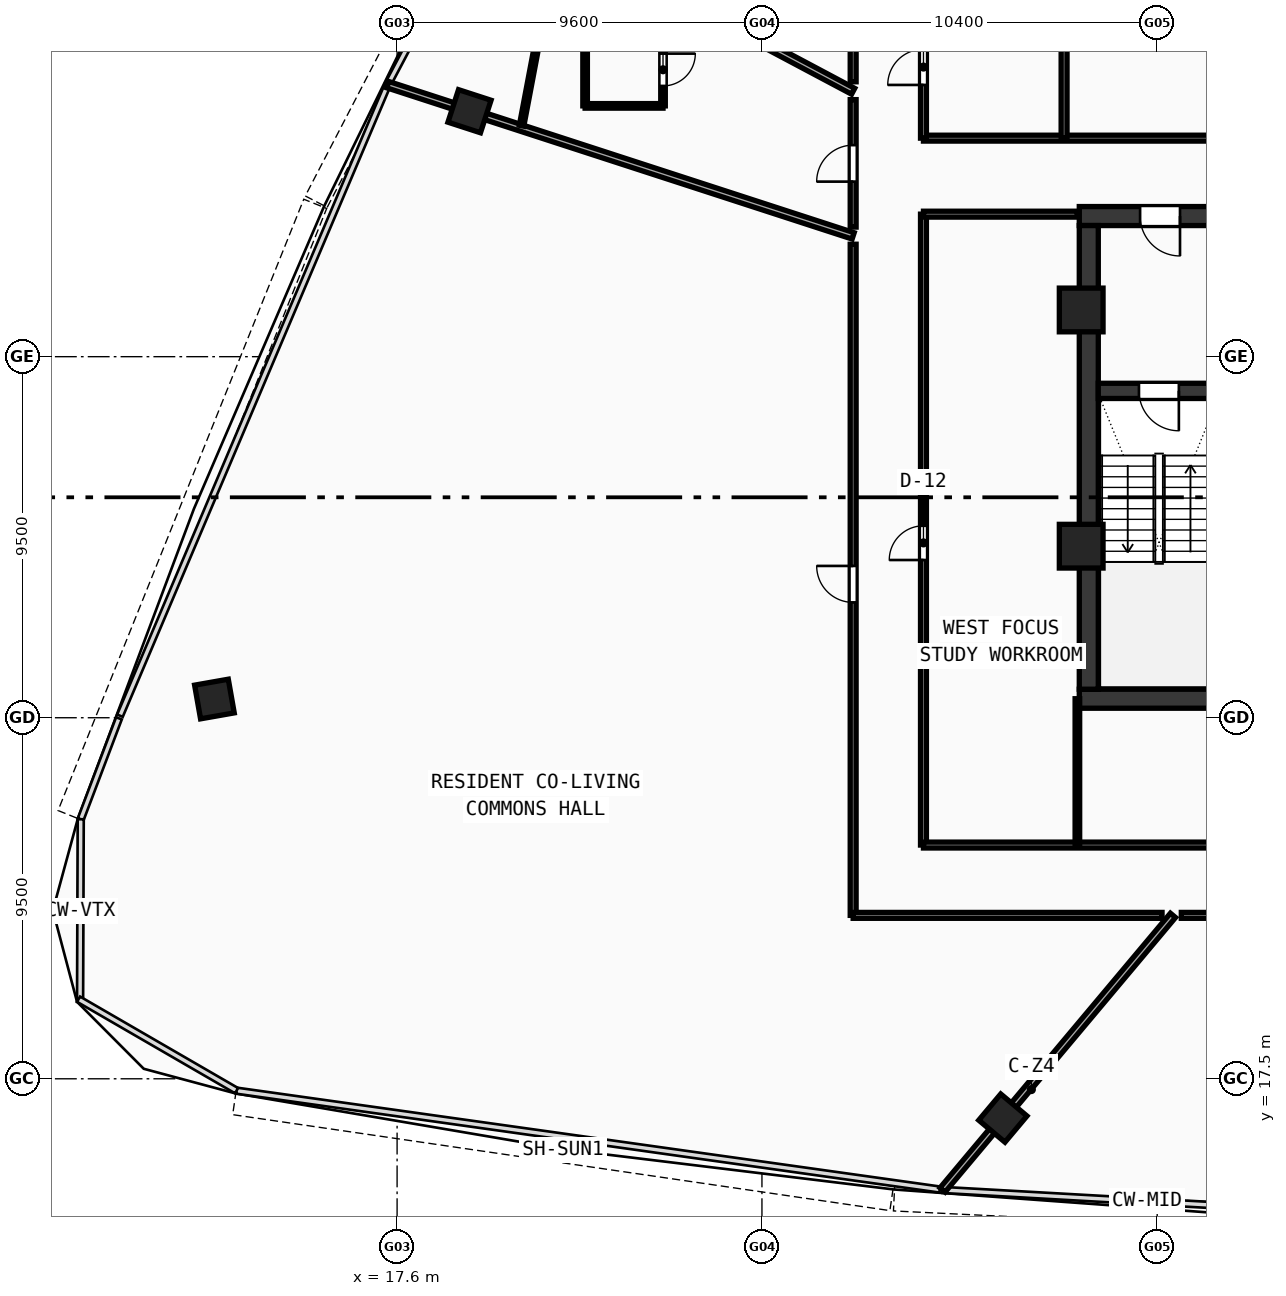
"""IFC4 building model, lengths in metres.
Left out: names, types, materials, properties, quantities, classifications, styles, units other than length and angle.
Written with IfcOpenShell. Run it as: python <this file> out.ifc"""

import sys

from ifc_helpers import new_model, si_unit, direction, frame, frame_2d, origin, origin_with_axes, origin_2d, place, context, subcontext, project, spatial, rectangle, hollow_rectangle, extrude, source, transform, mapped, element, fill, save


model = new_model("IFC4")
c1 = context("Model", 3, precision=1e-05, world=origin(), true_north=direction((0.0, 1.0)))
c2 = subcontext(c1, "Body", "Model", "MODEL_VIEW")
j1 = project(units=[si_unit("LENGTHUNIT", "METRE"), si_unit("PLANEANGLEUNIT", "RADIAN")], contexts=[c1])
p1 = place(None, origin())
s1 = spatial("IfcSite", under=j1, at=p1, CompositionType="ELEMENT")
p2 = place(p1, origin())
s2 = spatial("IfcBuilding", under=s1, at=p2, CompositionType="ELEMENT")
p3 = place(p2, frame((0.0, 0.0, 188.56)))
s3 = spatial("IfcBuildingStorey", under=s2, at=p3, CompositionType="ELEMENT", Elevation=188.56)
p4 = place(p3, frame((35.55, 27.5, 0.0), z_axis=(0.0, 0.0, 1.0), x_axis=(1.0, 0.0, 0.0)))
e1 = element("IfcWall", 1, at=p4, inside=s3, PredefinedType="SHEAR", context=c2, shape_type="SweptSolid", body=[
    extrude(rectangle(XDim=24.9, YDim=0.5, at=frame_2d((12.45, 0.0))), origin(), (0.0, 0.0, 1.0), 3.54),
])
p5 = place(p3, frame((35.55, 40.2, 0.0), z_axis=(0.0, 0.0, 1.0), x_axis=(1.0, 0.0, 0.0)))
e2 = element("IfcWall", 2, at=p5, inside=s3, PredefinedType="SHEAR", context=c2, shape_type="SweptSolid", body=[
    extrude(rectangle(XDim=11.25, YDim=0.5, at=frame_2d((5.625, 0.0))), origin(), (0.0, 0.0, 1.0), 3.54),
])
p6 = place(p5, frame((1.6, 0.0, 0.0)))
e3 = element("IfcOpeningElement", 3, at=p6, cuts=e2, PredefinedType="OPENING", context=c2, shape_type="SweptSolid", body=[
    extrude(rectangle(XDim=1.05, YDim=2.1, at=frame_2d((0.525, 1.05))), frame((0.0, 0.26, 0.0), z_axis=(0.0, -1.0, 0.0), x_axis=(1.0, 0.0, 0.0)), (0.0, 0.0, 1.0), 0.52),
])
p7 = place(p3, frame((35.8, 27.75, 0.0), z_axis=(0.0, 0.0, 1.0), x_axis=(0.0, 1.0, 0.0)))
e4 = element("IfcWall", 4, at=p7, inside=s3, PredefinedType="SHEAR", context=c2, shape_type="SweptSolid", body=[
    extrude(rectangle(XDim=12.2, YDim=0.5, at=frame_2d((6.1, 0.0))), origin(), (0.0, 0.0, 1.0), 3.54),
])
p8 = place(p3, frame((36.05, 35.6, 0.0), z_axis=(0.0, 0.0, 1.0), x_axis=(1.0, 0.0, 0.0)))
e5 = element("IfcWall", 5, at=p8, inside=s3, PredefinedType="SHEAR", context=c2, shape_type="SweptSolid", body=[
    extrude(rectangle(XDim=3.15, YDim=0.4, at=frame_2d((1.575, 0.0))), origin(), (0.0, 0.0, 1.0), 3.54),
])
p9 = place(p8, frame((1.07, 0.0, 0.0)))
e6 = element("IfcOpeningElement", 6, at=p9, cuts=e5, PredefinedType="OPENING", context=c2, shape_type="SweptSolid", body=[
    extrude(rectangle(XDim=1.05, YDim=2.1, at=frame_2d((0.525, 1.05))), frame((0.0, 0.21, 0.0), z_axis=(0.0, -1.0, 0.0), x_axis=(1.0, 0.0, 0.0)), (0.0, 0.0, 1.0), 0.42),
])
m1 = source(origin(), c2, "Body", "SweptSolid", [
    extrude(hollow_rectangle(XDim=1.15, YDim=1.15, WallThickness=0.048, at=origin_2d()), origin(), (0.0, 0.0, 1.0), 3.8),
])
for number, where, z_axis, x_axis in (
    (7, (35.6, 37.729, -0.26), (0.0, 0.0, 1.0), (1.0, 0.0, 0.0)),
    (8, (35.6, 31.513, -0.26), (0.0, 0.0, 1.0), (1.0, 0.0, 0.0)),
):
    element("IfcColumn", number, at=place(p3, frame(where, z_axis=z_axis, x_axis=x_axis)), inside=s3, PredefinedType="COLUMN", context=c2, shape_type="MappedRepresentation", body=[
        mapped(m1, transform((0.0, 0.0, 0.0), scale=1.0)),
    ])
m2 = source(origin(), c2, "Body", "SweptSolid", [
    extrude(hollow_rectangle(XDim=0.9, YDim=0.9, WallThickness=0.036, at=origin_2d()), origin(), (0.0, 0.0, 1.0), 3.8),
])
for number, where, z_axis, x_axis in (
    (9, (33.539, 16.466, -0.26), (0.0, 0.0, 1.0), (0.766, -0.643, 0.0)),
    (10, (19.505, 42.958, -0.26), (0.0, 0.0, 1.0), (-0.309, -0.951, 0.0)),
    (11, (12.793, 27.492, -0.26), (0.0, 0.0, 1.0), (0.174, -0.985, 0.0)),
):
    element("IfcColumn", number, at=place(p3, frame(where, z_axis=z_axis, x_axis=x_axis)), inside=s3, PredefinedType="COLUMN", context=c2, shape_type="MappedRepresentation", body=[
        mapped(m2, transform((0.0, 0.0, 0.0), scale=1.0)),
    ])
p10 = place(p3, frame((31.45, 42.25, 0.0), z_axis=(0.0, 0.0, 1.0), x_axis=(1.0, 0.0, 0.0)))
e12 = element("IfcWall", 12, at=p10, inside=s3, PredefinedType="PARTITIONING", context=c2, shape_type="SweptSolid", body=[
    extrude(rectangle(XDim=33.1, YDim=0.155, at=frame_2d((16.55, 0.0))), origin(), (0.0, 0.0, 1.0), 2.89),
])
p11 = place(p3, frame((31.45, 42.25, 0.0), z_axis=(0.0, 0.0, 1.0), x_axis=(0.0, 1.0, 0.0)))
e13 = element("IfcWall", 13, at=p11, inside=s3, PredefinedType="PARTITIONING", context=c2, shape_type="SweptSolid", body=[
    extrude(rectangle(XDim=11.7, YDim=0.155, at=frame_2d((5.85, 0.0))), origin(), (0.0, 0.0, 1.0), 2.89),
])
p12 = place(p11, frame((1.4, 0.0, 0.0)))
e14 = element("IfcOpeningElement", 14, at=p12, cuts=e13, PredefinedType="OPENING", context=c2, shape_type="SweptSolid", body=[
    extrude(rectangle(XDim=0.94, YDim=2.1, at=frame_2d((0.47, 1.05))), frame((0.0, 0.087, 0.0), z_axis=(0.0, -1.0, 0.0), x_axis=(1.0, 0.0, 0.0)), (0.0, 0.0, 1.0), 0.175),
])
p13 = place(p11, frame((6.8, 0.0, 0.0)))
e15 = element("IfcOpeningElement", 15, at=p13, cuts=e13, PredefinedType="OPENING", context=c2, shape_type="SweptSolid", body=[
    extrude(rectangle(XDim=0.92, YDim=2.1, at=frame_2d((0.46, 1.05))), frame((0.0, 0.087, 0.0), z_axis=(0.0, -1.0, 0.0), x_axis=(1.0, 0.0, 0.0)), (0.0, 0.0, 1.0), 0.175),
])
p14 = place(p3, frame((35.15, 42.25, 0.0), z_axis=(0.0, 0.0, 1.0), x_axis=(0.0, 1.0, 0.0)))
e16 = element("IfcWall", 16, at=p14, inside=s3, PredefinedType="PARTITIONING", context=c2, shape_type="SweptSolid", body=[
    extrude(rectangle(XDim=11.7, YDim=0.155, at=frame_2d((5.85, 0.0))), origin(), (0.0, 0.0, 1.0), 2.89),
])
p15 = place(p3, frame((31.45, 23.65, 0.0), z_axis=(0.0, 0.0, 1.0), x_axis=(0.0, 1.0, 0.0)))
e17 = element("IfcWall", 17, at=p15, inside=s3, PredefinedType="PARTITIONING", context=c2, shape_type="SweptSolid", body=[
    extrude(rectangle(XDim=16.6, YDim=0.155, at=frame_2d((8.3, 0.0))), origin(), (0.0, 0.0, 1.0), 2.89),
])
p16 = place(p15, frame((7.5, 0.0, 0.0)))
e18 = element("IfcOpeningElement", 18, at=p16, cuts=e17, PredefinedType="OPENING", context=c2, shape_type="SweptSolid", body=[
    extrude(rectangle(XDim=0.9, YDim=2.08, at=frame_2d((0.45, 1.04))), frame((0.0, 0.087, 0.0), z_axis=(0.0, -1.0, 0.0), x_axis=(1.0, 0.0, 0.0)), (0.0, 0.0, 1.0), 0.175),
])
p17 = place(p3, frame((31.45, 23.65, 0.0), z_axis=(0.0, 0.0, 1.0), x_axis=(1.0, 0.0, 0.0)))
e19 = element("IfcWall", 19, at=p17, inside=s3, PredefinedType="PARTITIONING", context=c2, shape_type="SweptSolid", body=[
    extrude(rectangle(XDim=33.1, YDim=0.155, at=frame_2d((16.55, 0.0))), origin(), (0.0, 0.0, 1.0), 2.89),
])
p18 = place(p17, frame((16.0, 0.0, 0.0)))
e20 = element("IfcOpeningElement", 20, at=p18, cuts=e19, PredefinedType="OPENING", context=c2, shape_type="SweptSolid", body=[
    extrude(rectangle(XDim=0.92, YDim=2.1, at=frame_2d((0.46, 1.05))), frame((0.0, 0.087, 0.0), z_axis=(0.0, -1.0, 0.0), x_axis=(1.0, 0.0, 0.0)), (0.0, 0.0, 1.0), 0.175),
])
p19 = place(p3, frame((31.45, 40.25, 0.0), z_axis=(0.0, 0.0, 1.0), x_axis=(1.0, 0.0, 0.0)))
e21 = element("IfcWall", 21, at=p19, inside=s3, PredefinedType="PARTITIONING", context=c2, shape_type="SweptSolid", body=[
    extrude(rectangle(XDim=4.05, YDim=0.155, at=frame_2d((2.025, 0.0))), origin(), (0.0, 0.0, 1.0), 3.54),
])
p20 = place(p3, frame((35.5, 23.65, 0.0), z_axis=(0.0, 0.0, 1.0), x_axis=(0.0, 1.0, 0.0)))
e22 = element("IfcWall", 22, at=p20, inside=s3, PredefinedType="PARTITIONING", context=c2, shape_type="SweptSolid", body=[
    extrude(rectangle(XDim=3.85, YDim=0.12, at=frame_2d((1.925, 0.0))), origin(), (0.0, 0.0, 1.0), 3.14),
])
p21 = place(p3, frame((29.6, 43.483, 0.0), z_axis=(0.0, 0.0, 1.0), x_axis=(-0.882940086537, 0.469485679853, 0.0)))
e23 = element("IfcWall", 23, at=p21, inside=s3, PredefinedType="PARTITIONING", context=c2, shape_type="SweptSolid", body=[
    extrude(rectangle(XDim=10.91, YDim=0.175, at=frame_2d((5.455, 0.0))), origin(), (0.0, 0.0, 1.0), 2.89),
])
p22 = place(p3, frame((29.6, 39.678, 0.0), z_axis=(0.0, 0.0, 1.0), x_axis=(-0.951054689993, 0.309022615097, 0.0)))
e24 = element("IfcWall", 24, at=p22, inside=s3, PredefinedType="PARTITIONING", context=c2, shape_type="SweptSolid", body=[
    extrude(rectangle(XDim=12.875, YDim=0.175, at=frame_2d((6.438, 0.0))), origin(), (0.0, 0.0, 1.0), 2.89),
])
p23 = place(p3, frame((38.015, 21.8, 0.0), z_axis=(0.0, 0.0, 1.0), x_axis=(-0.642777943688, -0.766052553751, 0.0)))
e25 = element("IfcWall", 25, at=p23, inside=s3, PredefinedType="PARTITIONING", context=c2, shape_type="SweptSolid", body=[
    extrude(rectangle(XDim=9.431, YDim=0.175, at=frame_2d((4.715, 0.0))), origin(), (0.0, 0.0, 1.0), 2.89),
])
p24 = place(p3, frame((29.6, 21.8, 0.0), z_axis=(0.0, 0.0, 1.0), x_axis=(0.0, 1.0, 0.0)))
e26 = element("IfcWall", 26, at=p24, inside=s3, PredefinedType="PARTITIONING", context=c2, shape_type="SweptSolid", body=[
    extrude(rectangle(XDim=17.659, YDim=0.155, at=frame_2d((8.829, 0.0))), origin(), (0.0, 0.0, 1.0), 2.89),
])
p25 = place(p24, frame((8.234, 0.0, 0.0)))
e27 = element("IfcOpeningElement", 27, at=p25, cuts=e26, PredefinedType="OPENING", context=c2, shape_type="SweptSolid", body=[
    extrude(rectangle(XDim=0.96, YDim=2.12, at=frame_2d((0.48, 1.06))), frame((0.0, 0.087, 0.0), z_axis=(0.0, -1.0, 0.0), x_axis=(1.0, 0.0, 0.0)), (0.0, 0.0, 1.0), 0.175),
])
p26 = place(p3, frame((29.6, 39.91, 0.0), z_axis=(0.0, 0.0, 1.0), x_axis=(0.0, 1.0, 0.0)))
e28 = element("IfcWall", 28, at=p26, inside=s3, PredefinedType="PARTITIONING", context=c2, shape_type="SweptSolid", body=[
    extrude(rectangle(XDim=3.354, YDim=0.155, at=frame_2d((1.677, 0.0))), origin(), (0.0, 0.0, 1.0), 3.54),
])
p27 = place(p26, frame((1.196, 0.0, 0.0)))
e29 = element("IfcOpeningElement", 29, at=p27, cuts=e28, PredefinedType="OPENING", context=c2, shape_type="SweptSolid", body=[
    extrude(rectangle(XDim=0.96, YDim=2.12, at=frame_2d((0.48, 1.06))), frame((0.0, 0.087, 0.0), z_axis=(0.0, -1.0, 0.0), x_axis=(1.0, 0.0, 0.0)), (0.0, 0.0, 1.0), 0.175),
])
p28 = place(p3, frame((29.6, 43.733, 0.0), z_axis=(0.0, 0.0, 1.0), x_axis=(0.0, 1.0, 0.0)))
e30 = element("IfcWall", 30, at=p28, inside=s3, PredefinedType="PARTITIONING", context=c2, shape_type="SweptSolid", body=[
    extrude(rectangle(XDim=6.315, YDim=0.155, at=frame_2d((3.157, 0.0))), origin(), (0.0, 0.0, 1.0), 2.89),
])
p29 = place(p28, frame((2.668, 0.0, 0.0)))
e31 = element("IfcOpeningElement", 31, at=p29, cuts=e30, PredefinedType="OPENING", context=c2, shape_type="SweptSolid", body=[
    extrude(rectangle(XDim=0.96, YDim=2.12, at=frame_2d((0.48, 1.06))), frame((0.0, 0.087, 0.0), z_axis=(0.0, -1.0, 0.0), x_axis=(1.0, 0.0, 0.0)), (0.0, 0.0, 1.0), 0.175),
])
p30 = place(p3, frame((44.583, 21.8, 0.0), z_axis=(0.0, 0.0, 1.0), x_axis=(-1.0, 0.0, 0.0)))
e32 = element("IfcWall", 32, at=p30, inside=s3, PredefinedType="PARTITIONING", context=c2, shape_type="SweptSolid", body=[
    extrude(rectangle(XDim=6.349, YDim=0.155, at=frame_2d((3.174, 0.0))), origin(), (0.0, 0.0, 1.0), 2.89),
])
p31 = place(p30, frame((2.696, 0.0, 0.0)))
e33 = element("IfcOpeningElement", 33, at=p31, cuts=e32, PredefinedType="OPENING", context=c2, shape_type="SweptSolid", body=[
    extrude(rectangle(XDim=0.96, YDim=2.12, at=frame_2d((0.48, 1.06))), frame((0.0, 0.087, 0.0), z_axis=(0.0, -1.0, 0.0), x_axis=(1.0, 0.0, 0.0)), (0.0, 0.0, 1.0), 0.175),
])
p32 = place(p3, frame((37.728, 21.8, 0.0), z_axis=(0.0, 0.0, 1.0), x_axis=(-1.0, 0.0, 0.0)))
e34 = element("IfcWall", 34, at=p32, inside=s3, PredefinedType="PARTITIONING", context=c2, shape_type="SweptSolid", body=[
    extrude(rectangle(XDim=8.127, YDim=0.155, at=frame_2d((4.064, 0.0))), origin(), (0.0, 0.0, 1.0), 3.14),
])
p33 = place(p3, frame((22.547, 43.099, 0.0), z_axis=(0.0, 0.0, 1.0), x_axis=(1.0, 0.0, 0.0)))
e35 = element("IfcWall", 35, at=p33, inside=s3, PredefinedType="PARTITIONING", context=c2, shape_type="SweptSolid", body=[
    extrude(rectangle(XDim=2.05, YDim=0.12, at=frame_2d((1.025, 0.0))), origin(), (0.0, 0.0, 1.0), 3.54),
])
p34 = place(p3, frame((24.597, 43.099, 0.0), z_axis=(0.0, 0.0, 1.0), x_axis=(0.0, 1.0, 0.0)))
e36 = element("IfcWall", 36, at=p34, inside=s3, PredefinedType="PARTITIONING", context=c2, shape_type="SweptSolid", body=[
    extrude(rectangle(XDim=1.9, YDim=0.12, at=frame_2d((0.95, 0.0))), origin(), (0.0, 0.0, 1.0), 3.54),
])
p35 = place(p34, frame((0.525, 0.0, 0.0)))
e37 = element("IfcOpeningElement", 37, at=p35, cuts=e36, PredefinedType="OPENING", context=c2, shape_type="SweptSolid", body=[
    extrude(rectangle(XDim=0.85, YDim=2.1, at=frame_2d((0.425, 1.05))), frame((0.0, 0.07, 0.0), z_axis=(0.0, -1.0, 0.0), x_axis=(1.0, 0.0, 0.0)), (0.0, 0.0, 1.0), 0.14),
])
p36 = place(p3, frame((22.547, 44.999, 0.0), z_axis=(0.0, 0.0, 1.0), x_axis=(0.0, -1.0, 0.0)))
e38 = element("IfcWall", 38, at=p36, inside=s3, PredefinedType="PARTITIONING", context=c2, shape_type="SweptSolid", body=[
    extrude(rectangle(XDim=1.9, YDim=0.12, at=frame_2d((0.95, 0.0))), origin(), (0.0, 0.0, 1.0), 3.54),
])
p37 = place(p3, frame((21.818, 47.553, 0.0), z_axis=(0.0, 0.0, 1.0), x_axis=(-0.186234987185, -0.982505231308, 0.0)))
e39 = element("IfcWall", 39, at=p37, inside=s3, PredefinedType="PARTITIONING", context=c2, shape_type="SweptSolid", body=[
    extrude(rectangle(XDim=5.065, YDim=0.12, at=frame_2d((2.533, 0.0))), origin(), (0.0, 0.0, 1.0), 2.89),
])
p38 = place(p37, frame((2.073, 0.0, 0.0)))
e40 = element("IfcOpeningElement", 40, at=p38, cuts=e39, PredefinedType="OPENING", context=c2, shape_type="SweptSolid", body=[
    extrude(rectangle(XDim=0.92, YDim=2.1, at=frame_2d((0.46, 1.05))), frame((0.0, 0.07, 0.0), z_axis=(0.0, -1.0, 0.0), x_axis=(1.0, 0.0, 0.0)), (0.0, 0.0, 1.0), 0.14),
])
m3 = source(origin(), c2, "Body", "SweptSolid", [
    extrude(rectangle(XDim=1.05, YDim=2.1, at=frame_2d((0.525, 1.05))), frame((0.0, 0.025, 0.0), z_axis=(0.0, -1.0, 0.0), x_axis=(1.0, 0.0, 0.0)), (0.0, 0.0, 1.0), 0.05),
])
p39 = place(p9, frame((1.05, 0.0, 0.0), z_axis=(0.0, 0.0, 1.0), x_axis=(-1.0, 0.0, 0.0)))
e41 = element("IfcDoor", 41, at=p39, inside=s3, OperationType="SINGLE_SWING_LEFT", PredefinedType="DOOR", context=c2, shape_type="MappedRepresentation", body=[
    mapped(m3, transform((0.0, 0.0, 0.0), scale=1.0)),
])
fill(e6, e41)
p40 = place(p6, frame((1.05, 0.0, 0.0), z_axis=(0.0, 0.0, 1.0), x_axis=(-1.0, 0.0, 0.0)))
e42 = element("IfcDoor", 42, at=p40, inside=s3, OperationType="SINGLE_SWING_LEFT", PredefinedType="DOOR", context=c2, shape_type="MappedRepresentation", body=[
    mapped(m3, transform((0.0, 0.0, 0.0), scale=1.0)),
])
fill(e3, e42)
m4 = source(origin(), c2, "Body", "SweptSolid", [
    extrude(rectangle(XDim=0.94, YDim=2.1, at=frame_2d((0.47, 1.05))), frame((0.0, 0.025, 0.0), z_axis=(0.0, -1.0, 0.0), x_axis=(1.0, 0.0, 0.0)), (0.0, 0.0, 1.0), 0.05),
])
p41 = place(p12, origin_with_axes())
e43 = element("IfcDoor", 43, at=p41, inside=s3, OperationType="SINGLE_SWING_LEFT", PredefinedType="DOOR", context=c2, shape_type="MappedRepresentation", body=[
    mapped(m4, transform((0.0, 0.0, 0.0), scale=1.0)),
])
fill(e14, e43)
m5 = source(origin(), c2, "Body", "SweptSolid", [
    extrude(rectangle(XDim=0.9, YDim=2.08, at=frame_2d((0.45, 1.04))), frame((0.0, 0.025, 0.0), z_axis=(0.0, -1.0, 0.0), x_axis=(1.0, 0.0, 0.0)), (0.0, 0.0, 1.0), 0.05),
])
p42 = place(p16, origin_with_axes())
e44 = element("IfcDoor", 44, at=p42, inside=s3, OperationType="SINGLE_SWING_LEFT", PredefinedType="DOOR", context=c2, shape_type="MappedRepresentation", body=[
    mapped(m5, transform((0.0, 0.0, 0.0), scale=1.0)),
])
fill(e18, e44)
m6 = source(origin(), c2, "Body", "SweptSolid", [
    extrude(rectangle(XDim=0.96, YDim=2.12, at=frame_2d((0.48, 1.06))), frame((0.0, 0.025, 0.0), z_axis=(0.0, -1.0, 0.0), x_axis=(1.0, 0.0, 0.0)), (0.0, 0.0, 1.0), 0.05),
])
p43 = place(p27, origin_with_axes())
e45 = element("IfcDoor", 45, at=p43, inside=s3, OperationType="SINGLE_SWING_LEFT", PredefinedType="DOOR", context=c2, shape_type="MappedRepresentation", body=[
    mapped(m6, transform((0.0, 0.0, 0.0), scale=1.0)),
])
fill(e29, e45)
m7 = source(origin(), c2, "Body", "SweptSolid", [
    extrude(rectangle(XDim=0.85, YDim=2.1, at=frame_2d((0.425, 1.05))), frame((0.0, 0.025, 0.0), z_axis=(0.0, -1.0, 0.0), x_axis=(1.0, 0.0, 0.0)), (0.0, 0.0, 1.0), 0.05),
])
p44 = place(p35, frame((0.85, 0.0, 0.0), z_axis=(0.0, 0.0, 1.0), x_axis=(-1.0, 0.0, 0.0)))
e46 = element("IfcDoor", 46, at=p44, inside=s3, OperationType="SINGLE_SWING_LEFT", PredefinedType="DOOR", context=c2, shape_type="MappedRepresentation", body=[
    mapped(m7, transform((0.0, 0.0, 0.0), scale=1.0)),
])
fill(e37, e46)
p45 = place(p25, origin_with_axes())
e47 = element("IfcDoor", 47, at=p45, inside=s3, OperationType="SINGLE_SWING_RIGHT", PredefinedType="DOOR", context=c2, shape_type="MappedRepresentation", body=[
    mapped(m6, transform((0.0, 0.0, 0.0), scale=1.0)),
])
fill(e27, e47)
save(model, sys.argv[1])
